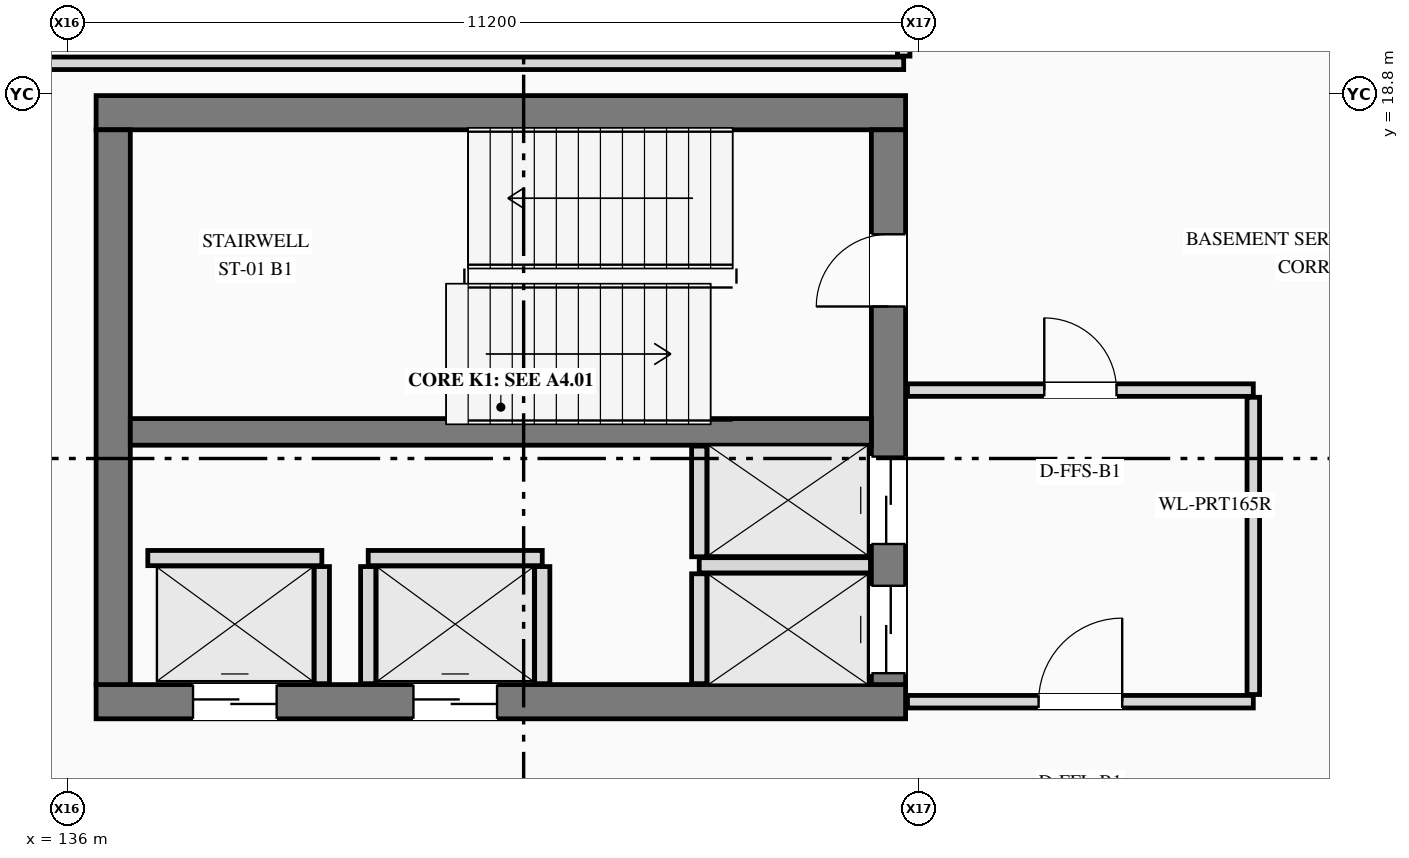
"""IFC4 building model, lengths in metres.
Left out: names, types, materials, properties, quantities, classifications, styles, units other than length and angle.
Written with IfcOpenShell. Run it as: python <this file> out.ifc"""

import sys

from ifc_helpers import new_model, si_unit, direction, frame, frame_2d, origin, place, context, subcontext, project, spatial, rectangle, extrude, element, fill, save


model = new_model("IFC4")
c1 = context("Model", 3, precision=1e-05, world=origin(), true_north=direction((0.0, 1.0)))
c2 = subcontext(c1, "Body", "Model", "MODEL_VIEW")
j1 = project(units=[si_unit("LENGTHUNIT", "METRE"), si_unit("PLANEANGLEUNIT", "RADIAN")], contexts=[c1])
p1 = place(None, origin())
s1 = spatial("IfcSite", under=j1, at=p1, CompositionType="ELEMENT")
p2 = place(p1, origin())
s2 = spatial("IfcBuilding", under=s1, at=p2, CompositionType="ELEMENT")
p3 = place(p2, frame((0.0, 0.0, -4.5)))
s3 = spatial("IfcBuildingStorey", under=s2, at=p3, CompositionType="ELEMENT", Elevation=-4.5)
p4 = place(p3, frame((136.375, 10.8, 0.0), z_axis=(0.0, 0.0, 1.0), x_axis=(1.0, 0.0, 0.0)))
e1 = element("IfcWall", 1, at=p4, inside=s3, PredefinedType="SHEAR", context=c2, shape_type="SweptSolid", body=[
    extrude(rectangle(XDim=10.65, YDim=0.45, at=frame_2d((5.325, 0.0))), origin(), (0.0, 0.0, 1.0), 4.5),
])
p5 = place(p4, frame((1.275, 0.0, 0.0)))
e2 = element("IfcOpeningElement", 2, at=p5, cuts=e1, PredefinedType="OPENING", context=c2, shape_type="SweptSolid", body=[
    extrude(rectangle(XDim=1.1, YDim=2.2, at=frame_2d((0.55, 1.1))), frame((0.0, 0.235, 0.0), z_axis=(0.0, -1.0, 0.0), x_axis=(1.0, 0.0, 0.0)), (0.0, 0.0, 1.0), 0.47),
])
p6 = place(p4, frame((4.175, 0.0, 0.0)))
e3 = element("IfcOpeningElement", 3, at=p6, cuts=e1, PredefinedType="OPENING", context=c2, shape_type="SweptSolid", body=[
    extrude(rectangle(XDim=1.1, YDim=2.2, at=frame_2d((0.55, 1.1))), frame((0.0, 0.235, 0.0), z_axis=(0.0, -1.0, 0.0), x_axis=(1.0, 0.0, 0.0)), (0.0, 0.0, 1.0), 0.47),
])
p7 = place(p3, frame((147.025, 18.55, 0.0), z_axis=(0.0, 0.0, 1.0), x_axis=(-1.0, 0.0, 0.0)))
e4 = element("IfcWall", 4, at=p7, inside=s3, PredefinedType="SHEAR", context=c2, shape_type="SweptSolid", body=[
    extrude(rectangle(XDim=10.65, YDim=0.45, at=frame_2d((5.325, 0.0))), origin(), (0.0, 0.0, 1.0), 4.5),
])
p8 = place(p3, frame((136.6, 18.325, 0.0), z_axis=(0.0, 0.0, 1.0), x_axis=(0.0, -1.0, 0.0)))
e5 = element("IfcWall", 5, at=p8, inside=s3, PredefinedType="SHEAR", context=c2, shape_type="SweptSolid", body=[
    extrude(rectangle(XDim=7.3, YDim=0.45, at=frame_2d((3.65, 0.0))), origin(), (0.0, 0.0, 1.0), 4.5),
])
p9 = place(p3, frame((146.8, 11.025, 0.0), z_axis=(0.0, 0.0, 1.0), x_axis=(0.0, 1.0, 0.0)))
e6 = element("IfcWall", 6, at=p9, inside=s3, PredefinedType="SHEAR", context=c2, shape_type="SweptSolid", body=[
    extrude(rectangle(XDim=7.3, YDim=0.45, at=frame_2d((3.65, 0.0))), origin(), (0.0, 0.0, 1.0), 4.5),
])
p10 = place(p9, frame((4.975, 0.0, 0.0)))
e7 = element("IfcOpeningElement", 7, at=p10, cuts=e6, PredefinedType="OPENING", context=c2, shape_type="SweptSolid", body=[
    extrude(rectangle(XDim=0.95, YDim=2.2, at=frame_2d((0.475, 1.1))), frame((0.0, 0.235, 0.0), z_axis=(0.0, -1.0, 0.0), x_axis=(1.0, 0.0, 0.0)), (0.0, 0.0, 1.0), 0.47),
])
p11 = place(p9, frame((0.15, 0.0, 0.0)))
e8 = element("IfcOpeningElement", 8, at=p11, cuts=e6, PredefinedType="OPENING", context=c2, shape_type="SweptSolid", body=[
    extrude(rectangle(XDim=1.15, YDim=2.25, at=frame_2d((0.575, 1.125))), frame((0.0, 0.235, 0.0), z_axis=(0.0, -1.0, 0.0), x_axis=(1.0, 0.0, 0.0)), (0.0, 0.0, 1.0), 0.47),
])
p12 = place(p9, frame((1.85, 0.0, 0.0)))
e9 = element("IfcOpeningElement", 9, at=p12, cuts=e6, PredefinedType="OPENING", context=c2, shape_type="SweptSolid", body=[
    extrude(rectangle(XDim=1.15, YDim=2.25, at=frame_2d((0.575, 1.125))), frame((0.0, 0.235, 0.0), z_axis=(0.0, -1.0, 0.0), x_axis=(1.0, 0.0, 0.0)), (0.0, 0.0, 1.0), 0.47),
])
p13 = place(p3, frame((136.825, 14.35, 0.0), z_axis=(0.0, 0.0, 1.0), x_axis=(1.0, 0.0, 0.0)))
e10 = element("IfcWall", 10, at=p13, inside=s3, PredefinedType="SHEAR", context=c2, shape_type="SweptSolid", body=[
    extrude(rectangle(XDim=9.75, YDim=0.35, at=frame_2d((4.875, 0.0))), origin(), (0.0, 0.0, 1.0), 4.5),
])
p14 = place(p3, frame((137.055, 12.69, 0.0), z_axis=(0.0, 0.0, 1.0), x_axis=(1.0, 0.0, 0.0)))
e11 = element("IfcWall", 11, at=p14, inside=s3, PredefinedType="PLUMBINGWALL", context=c2, shape_type="SweptSolid", body=[
    extrude(rectangle(XDim=2.29, YDim=0.2, at=frame_2d((1.145, 0.0))), origin(), (0.0, 0.0, 1.0), 4.175),
])
p15 = place(p3, frame((139.345, 11.037, 0.0), z_axis=(0.0, 0.0, 1.0), x_axis=(0.0, 1.0, 0.0)))
e12 = element("IfcWall", 12, at=p15, inside=s3, PredefinedType="PLUMBINGWALL", context=c2, shape_type="SweptSolid", body=[
    extrude(rectangle(XDim=1.541, YDim=0.2, at=frame_2d((0.771, 0.0))), origin(), (0.0, 0.0, 1.0), 4.175),
])
p16 = place(p3, frame((139.955, 12.69, 0.0), z_axis=(0.0, 0.0, 1.0), x_axis=(1.0, 0.0, 0.0)))
e13 = element("IfcWall", 13, at=p16, inside=s3, PredefinedType="PLUMBINGWALL", context=c2, shape_type="SweptSolid", body=[
    extrude(rectangle(XDim=2.29, YDim=0.2, at=frame_2d((1.145, 0.0))), origin(), (0.0, 0.0, 1.0), 4.175),
])
for number, where, z_axis, x_axis in (
    (14, (139.955, 11.037, 0.0), (0.0, 0.0, 1.0), (0.0, 1.0, 0.0)),
    (15, (142.245, 11.037, 0.0), (0.0, 0.0, 1.0), (0.0, 1.0, 0.0)),
):
    element("IfcWall", number, at=place(p3, frame(where, z_axis=z_axis, x_axis=x_axis)), inside=s3, PredefinedType="PLUMBINGWALL", context=c2, shape_type="SweptSolid", body=[
        extrude(rectangle(XDim=1.541, YDim=0.2, at=frame_2d((0.771, 0.0))), origin(), (0.0, 0.0, 1.0), 4.175),
    ])
p17 = place(p3, frame((144.31, 12.595, 0.0), z_axis=(0.0, 0.0, 1.0), x_axis=(1.0, 0.0, 0.0)))
e16 = element("IfcWall", 16, at=p17, inside=s3, PredefinedType="PLUMBINGWALL", context=c2, shape_type="SweptSolid", body=[
    extrude(rectangle(XDim=2.253, YDim=0.2, at=frame_2d((1.126, 0.0))), origin(), (0.0, 0.0, 1.0), 4.175),
])
p18 = place(p3, frame((144.31, 11.037, 0.0), z_axis=(0.0, 0.0, 1.0), x_axis=(0.0, 1.0, 0.0)))
e17 = element("IfcWall", 17, at=p18, inside=s3, PredefinedType="PLUMBINGWALL", context=c2, shape_type="SweptSolid", body=[
    extrude(rectangle(XDim=1.446, YDim=0.2, at=frame_2d((0.723, 0.0))), origin(), (0.0, 0.0, 1.0), 4.175),
])
p19 = place(p3, frame((144.31, 12.707, 0.0), z_axis=(0.0, 0.0, 1.0), x_axis=(0.0, 1.0, 0.0)))
e18 = element("IfcWall", 18, at=p19, inside=s3, PredefinedType="PLUMBINGWALL", context=c2, shape_type="SweptSolid", body=[
    extrude(rectangle(XDim=1.456, YDim=0.2, at=frame_2d((0.728, 0.0))), origin(), (0.0, 0.0, 1.0), 4.175),
])
p20 = place(p3, frame((147.05, 10.8, 0.0), z_axis=(0.0, 0.0, 1.0), x_axis=(1.0, 0.0, 0.0)))
e19 = element("IfcWall", 19, at=p20, inside=s3, PredefinedType="PARTITIONING", context=c2, shape_type="SweptSolid", body=[
    extrude(rectangle(XDim=4.55, YDim=0.165, at=frame_2d((2.275, 0.0))), origin(), (0.0, 0.0, 1.0), 4.175),
])
p21 = place(p20, frame((1.725, 0.0, 0.0)))
e20 = element("IfcOpeningElement", 20, at=p21, cuts=e19, PredefinedType="OPENING", context=c2, shape_type="SweptSolid", body=[
    extrude(rectangle(XDim=1.1, YDim=2.2, at=frame_2d((0.55, 1.1))), frame((0.0, 0.093, 0.0), z_axis=(0.0, -1.0, 0.0), x_axis=(1.0, 0.0, 0.0)), (0.0, 0.0, 1.0), 0.185),
])
p22 = place(p3, frame((147.05, 14.9, 0.0), z_axis=(0.0, 0.0, 1.0), x_axis=(1.0, 0.0, 0.0)))
e21 = element("IfcWall", 21, at=p22, inside=s3, PredefinedType="PARTITIONING", context=c2, shape_type="SweptSolid", body=[
    extrude(rectangle(XDim=4.55, YDim=0.165, at=frame_2d((2.275, 0.0))), origin(), (0.0, 0.0, 1.0), 4.175),
])
p23 = place(p22, frame((1.8, 0.0, 0.0)))
e22 = element("IfcOpeningElement", 22, at=p23, cuts=e21, PredefinedType="OPENING", context=c2, shape_type="SweptSolid", body=[
    extrude(rectangle(XDim=0.95, YDim=2.2, at=frame_2d((0.475, 1.1))), frame((0.0, 0.093, 0.0), z_axis=(0.0, -1.0, 0.0), x_axis=(1.0, 0.0, 0.0)), (0.0, 0.0, 1.0), 0.185),
])
p24 = place(p3, frame((151.6, 10.895, 0.0), z_axis=(0.0, 0.0, 1.0), x_axis=(0.0, 1.0, 0.0)))
e23 = element("IfcWall", 23, at=p24, inside=s3, PredefinedType="PARTITIONING", context=c2, shape_type="SweptSolid", body=[
    extrude(rectangle(XDim=3.911, YDim=0.165, at=frame_2d((1.956, 0.0))), origin(), (0.0, 0.0, 1.0), 4.175),
])
p25 = place(p3, frame((0.5, 19.2, 0.0), z_axis=(0.0, 0.0, 1.0), x_axis=(1.0, 0.0, 0.0)))
e24 = element("IfcWall", 24, at=p25, inside=s3, PredefinedType="PARTITIONING", context=c2, shape_type="SweptSolid", body=[
    extrude(rectangle(XDim=146.5, YDim=0.165, at=frame_2d((73.25, 0.0))), origin(), (0.0, 0.0, 1.0), 3.649),
])
p26 = place(p25, frame((91.15, 0.0, 0.0)))
e25 = element("IfcOpeningElement", 25, at=p26, cuts=e24, PredefinedType="OPENING", context=c2, shape_type="SweptSolid", body=[
    extrude(rectangle(XDim=1.5, YDim=2.25, at=frame_2d((0.75, 1.125))), frame((0.0, 0.093, 0.0), z_axis=(0.0, -1.0, 0.0), x_axis=(1.0, 0.0, 0.0)), (0.0, 0.0, 1.0), 0.185),
])
p27 = place(p3, frame((147.0, 19.294, 0.0), z_axis=(0.0, 0.0, 1.0), x_axis=(0.0, 1.0, 0.0)))
e26 = element("IfcWall", 26, at=p27, inside=s3, PredefinedType="PARTITIONING", context=c2, shape_type="SweptSolid", body=[
    extrude(rectangle(XDim=48.141, YDim=0.165, at=frame_2d((24.07, 0.0))), origin(), (0.0, 0.0, 1.0), 3.413),
])
p28 = place(p10, origin())
e27 = element("IfcDoor", 27, at=p28, inside=s3, OperationType="SINGLE_SWING_LEFT", PredefinedType="DOOR", context=c2, shape_type="SweptSolid", body=[
    extrude(rectangle(XDim=0.95, YDim=2.2, at=frame_2d((0.475, 1.1))), frame((0.0, 0.025, 0.0), z_axis=(0.0, -1.0, 0.0), x_axis=(1.0, 0.0, 0.0)), (0.0, 0.0, 1.0), 0.05),
])
fill(e7, e27)
p29 = place(p5, origin())
e28 = element("IfcDoor", 28, at=p29, inside=s3, OperationType="SLIDING_TO_LEFT", PredefinedType="DOOR", context=c2, shape_type="SweptSolid", body=[
    extrude(rectangle(XDim=1.1, YDim=2.2, at=frame_2d((0.55, 1.1))), frame((0.0, 0.025, 0.0), z_axis=(0.0, -1.0, 0.0), x_axis=(1.0, 0.0, 0.0)), (0.0, 0.0, 1.0), 0.05),
])
fill(e2, e28)
p30 = place(p6, origin())
e29 = element("IfcDoor", 29, at=p30, inside=s3, OperationType="SLIDING_TO_RIGHT", PredefinedType="DOOR", context=c2, shape_type="SweptSolid", body=[
    extrude(rectangle(XDim=1.1, YDim=2.2, at=frame_2d((0.55, 1.1))), frame((0.0, 0.025, 0.0), z_axis=(0.0, -1.0, 0.0), x_axis=(1.0, 0.0, 0.0)), (0.0, 0.0, 1.0), 0.05),
])
fill(e3, e29)
p31 = place(p11, origin())
e30 = element("IfcDoor", 30, at=p31, inside=s3, OperationType="SLIDING_TO_LEFT", PredefinedType="DOOR", context=c2, shape_type="SweptSolid", body=[
    extrude(rectangle(XDim=1.15, YDim=2.25, at=frame_2d((0.575, 1.125))), frame((0.0, 0.025, 0.0), z_axis=(0.0, -1.0, 0.0), x_axis=(1.0, 0.0, 0.0)), (0.0, 0.0, 1.0), 0.05),
])
fill(e8, e30)
p32 = place(p12, origin())
e31 = element("IfcDoor", 31, at=p32, inside=s3, OperationType="SLIDING_TO_RIGHT", PredefinedType="DOOR", context=c2, shape_type="SweptSolid", body=[
    extrude(rectangle(XDim=1.15, YDim=2.25, at=frame_2d((0.575, 1.125))), frame((0.0, 0.025, 0.0), z_axis=(0.0, -1.0, 0.0), x_axis=(1.0, 0.0, 0.0)), (0.0, 0.0, 1.0), 0.05),
])
fill(e9, e31)
p33 = place(p21, origin())
e32 = element("IfcDoor", 32, at=p33, inside=s3, OperationType="SINGLE_SWING_RIGHT", PredefinedType="DOOR", context=c2, shape_type="SweptSolid", body=[
    extrude(rectangle(XDim=1.1, YDim=2.2, at=frame_2d((0.55, 1.1))), frame((0.0, 0.025, 0.0), z_axis=(0.0, -1.0, 0.0), x_axis=(1.0, 0.0, 0.0)), (0.0, 0.0, 1.0), 0.05),
])
fill(e20, e32)
p34 = place(p23, origin())
e33 = element("IfcDoor", 33, at=p34, inside=s3, OperationType="SINGLE_SWING_LEFT", PredefinedType="DOOR", context=c2, shape_type="SweptSolid", body=[
    extrude(rectangle(XDim=0.95, YDim=2.2, at=frame_2d((0.475, 1.1))), frame((0.0, 0.025, 0.0), z_axis=(0.0, -1.0, 0.0), x_axis=(1.0, 0.0, 0.0)), (0.0, 0.0, 1.0), 0.05),
])
fill(e22, e33)
save(model, sys.argv[1])
